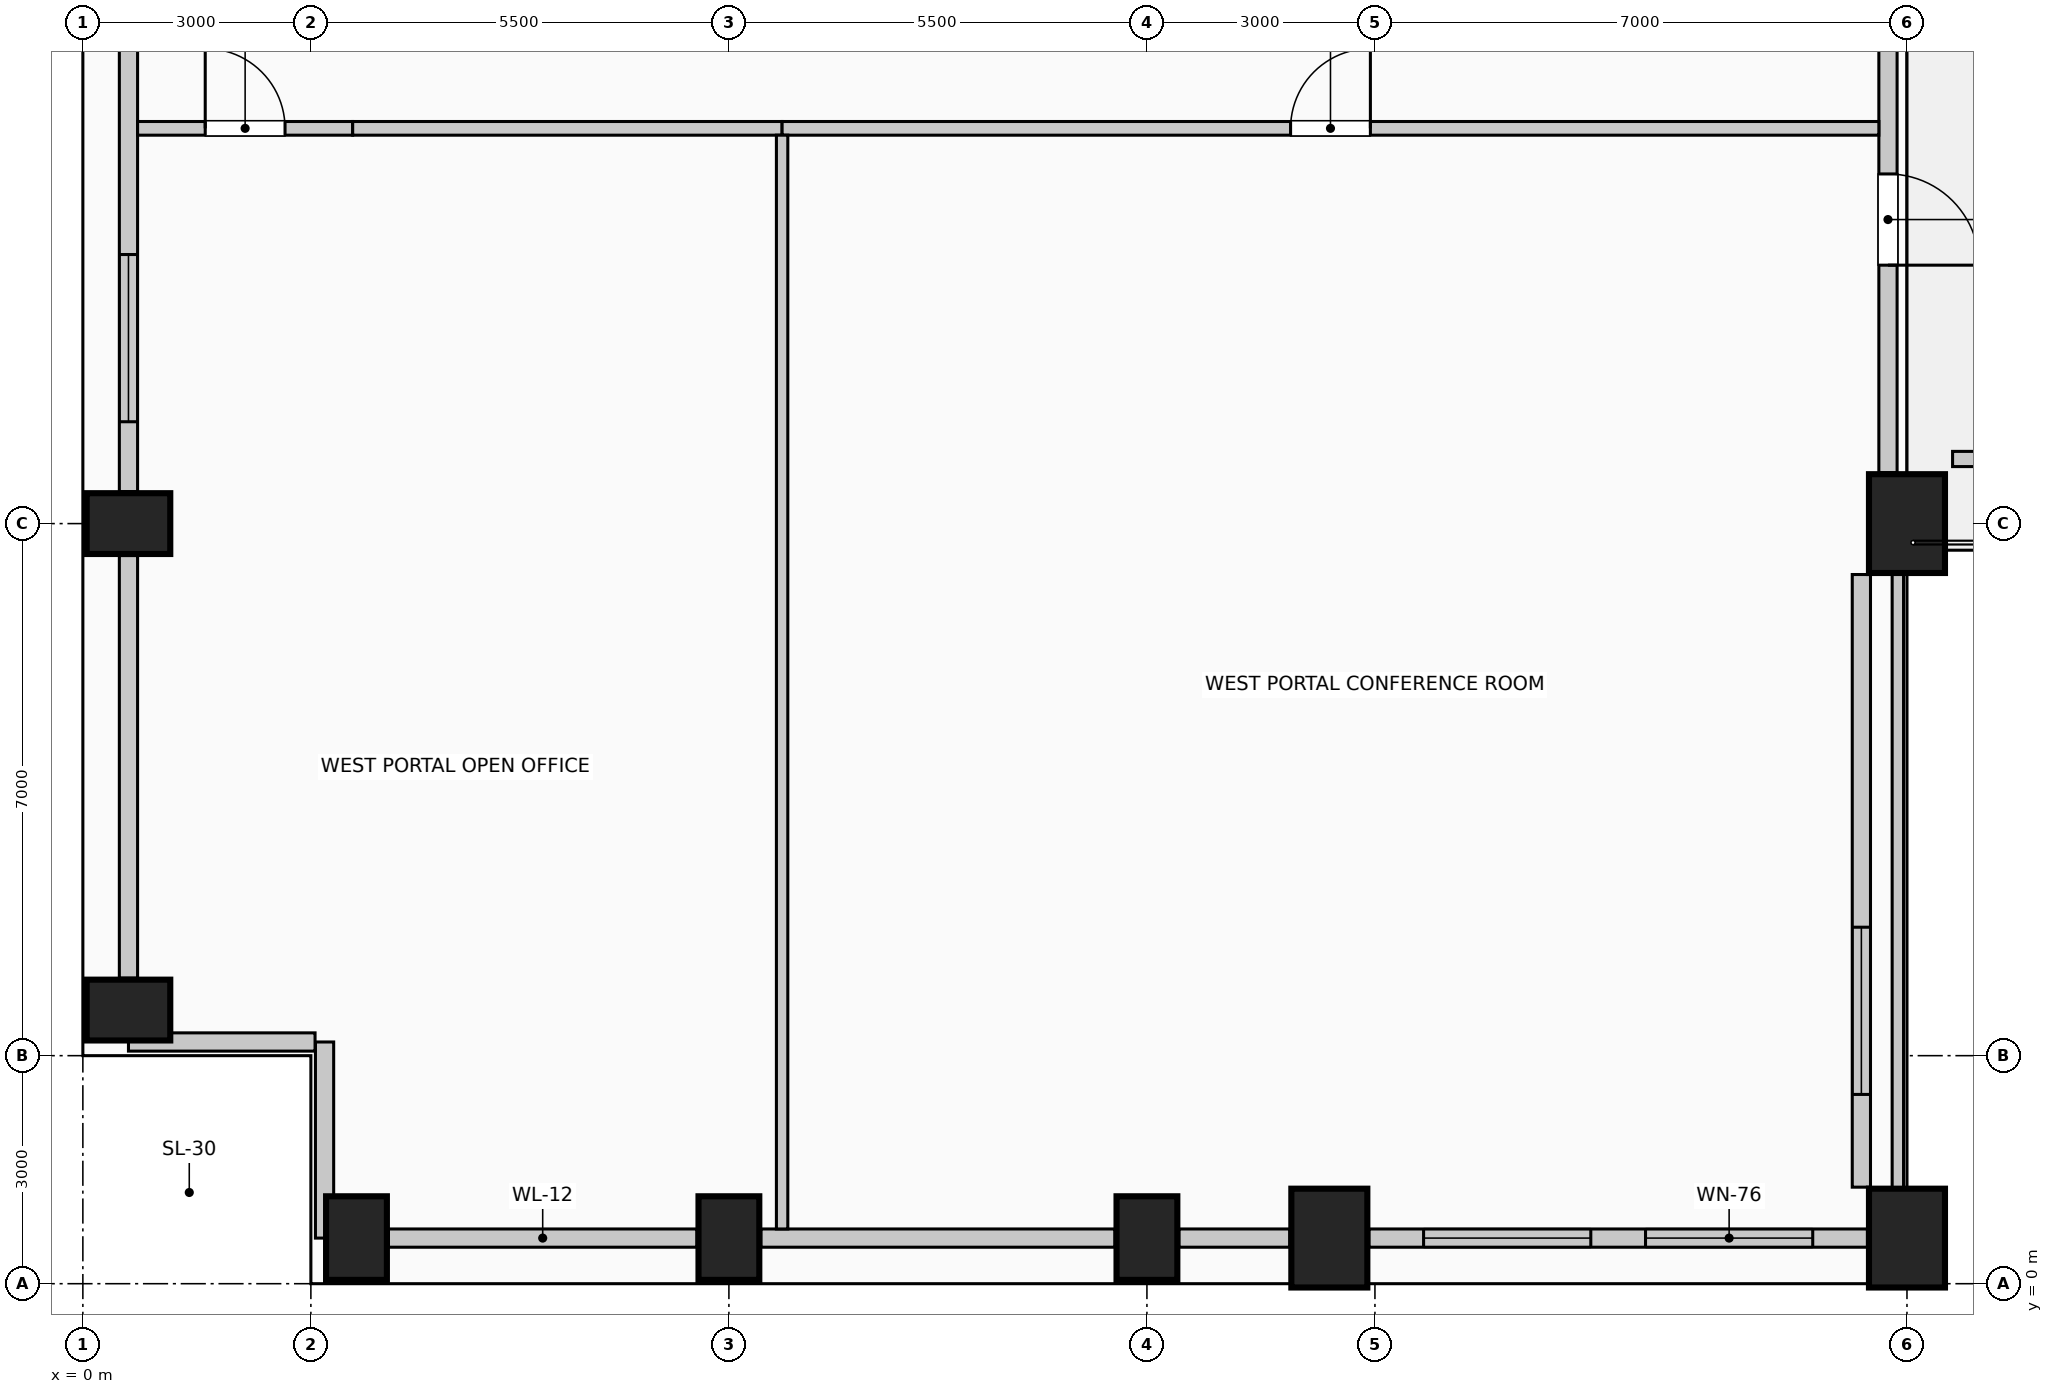
"""IFC4 building model, lengths in metres.
Left out: names, types, materials, properties, quantities, classifications, styles, units other than length and angle.
Written with IfcOpenShell. Run it as: python <this file> out.ifc"""

import sys

from ifc_helpers import new_model, si_unit, direction, frame, frame_2d, origin, origin_2d, place, context, subcontext, project, spatial, rectangle, extrude, element, fill, save


model = new_model("IFC4")
c1 = context("Model", 3, precision=1e-05, world=origin(), true_north=direction((0.0, 1.0)))
c2 = subcontext(c1, "Body", "Model", "MODEL_VIEW")
j1 = project(units=[si_unit("LENGTHUNIT", "METRE"), si_unit("PLANEANGLEUNIT", "RADIAN")], contexts=[c1])
p1 = place(None, origin())
s1 = spatial("IfcSite", under=j1, at=p1, CompositionType="ELEMENT")
p2 = place(p1, origin())
s2 = spatial("IfcBuilding", under=s1, at=p2, CompositionType="ELEMENT")
p3 = place(p2, frame((0.0, 0.0, 182.6)))
s3 = spatial("IfcBuildingStorey", under=s2, at=p3, CompositionType="ELEMENT", Elevation=182.6)
for number, where, z_axis, x_axis in (
    (1, (3.6, 0.6, 0.0), (0.0, 0.0, 1.0), (1.0, 0.0, 0.0)),
    (2, (8.5, 0.6, 0.0), (0.0, 0.0, 1.0), (1.0, 0.0, 0.0)),
    (3, (14.0, 0.6, 0.0), (0.0, 0.0, 1.0), (1.0, 0.0, 0.0)),
):
    element("IfcColumn", number, at=place(p3, frame(where, z_axis=z_axis, x_axis=x_axis)), inside=s3, PredefinedType="COLUMN", context=c2, shape_type="SweptSolid", body=[
        extrude(rectangle(XDim=0.8, YDim=1.1, at=origin_2d()), origin(), (0.0, 0.0, 1.0), 4.0),
    ])
for number, where, z_axis, x_axis in (
    (4, (16.4, 0.6, 0.0), (0.0, 0.0, 1.0), (1.0, 0.0, 0.0)),
    (5, (24.0, 0.6, 0.0), (0.0, 0.0, 1.0), (1.0, 0.0, 0.0)),
):
    element("IfcColumn", number, at=place(p3, frame(where, z_axis=z_axis, x_axis=x_axis)), inside=s3, PredefinedType="COLUMN", context=c2, shape_type="SweptSolid", body=[
        extrude(rectangle(XDim=1.0, YDim=1.3, at=origin_2d()), origin(), (0.0, 0.0, 1.0), 4.0),
    ])
for number, where, z_axis, x_axis in (
    (6, (0.6, 3.6, 0.0), (0.0, 0.0, 1.0), (0.0, 1.0, 0.0)),
    (7, (0.6, 10.0, 0.0), (0.0, 0.0, 1.0), (0.0, 1.0, 0.0)),
):
    element("IfcColumn", number, at=place(p3, frame(where, z_axis=z_axis, x_axis=x_axis)), inside=s3, PredefinedType="COLUMN", context=c2, shape_type="SweptSolid", body=[
        extrude(rectangle(XDim=0.8, YDim=1.1, at=origin_2d()), origin(), (0.0, 0.0, 1.0), 4.0),
    ])
p4 = place(p3, frame((24.0, 10.0, 0.0), z_axis=(0.0, 0.0, 1.0), x_axis=(1.0, 0.0, 0.0)))
e8 = element("IfcColumn", 8, at=p4, inside=s3, PredefinedType="COLUMN", context=c2, shape_type="SweptSolid", body=[
    extrude(rectangle(XDim=1.0, YDim=1.3, at=origin_2d()), origin(), (0.0, 0.0, 1.0), 4.0),
])
p5 = place(p3, frame((8.08, 0.6, 0.0), z_axis=(0.0, 0.0, 1.0), x_axis=(-1.0, 0.0, 0.0)))
e9 = element("IfcWall", 9, at=p5, inside=s3, PredefinedType="SOLIDWALL", context=c2, shape_type="SweptSolid", body=[
    extrude(rectangle(XDim=4.06, YDim=0.24, at=frame_2d((2.03, 0.0))), origin(), (0.0, 0.0, 1.0), 3.0),
])
p6 = place(p3, frame((13.58, 0.6, 0.0), z_axis=(0.0, 0.0, 1.0), x_axis=(-1.0, 0.0, 0.0)))
e10 = element("IfcWall", 10, at=p6, inside=s3, PredefinedType="SOLIDWALL", context=c2, shape_type="SweptSolid", body=[
    extrude(rectangle(XDim=4.66, YDim=0.24, at=frame_2d((2.33, 0.0))), origin(), (0.0, 0.0, 1.0), 3.0),
])
p7 = place(p3, frame((15.88, 0.6, 0.0), z_axis=(0.0, 0.0, 1.0), x_axis=(-1.0, 0.0, 0.0)))
e11 = element("IfcWall", 11, at=p7, inside=s3, PredefinedType="SOLIDWALL", context=c2, shape_type="SweptSolid", body=[
    extrude(rectangle(XDim=1.46, YDim=0.24, at=frame_2d((0.73, 0.0))), origin(), (0.0, 0.0, 1.0), 3.0),
])
p8 = place(p3, frame((23.48, 0.6, 0.0), z_axis=(0.0, 0.0, 1.0), x_axis=(-1.0, 0.0, 0.0)))
e12 = element("IfcWall", 12, at=p8, inside=s3, PredefinedType="SOLIDWALL", context=c2, shape_type="SweptSolid", body=[
    extrude(rectangle(XDim=6.56, YDim=0.24, at=frame_2d((3.28, 0.0))), origin(), (0.0, 0.0, 1.0), 3.0),
])
p9 = place(p8, frame((0.72, 0.0, 0.42)))
e13 = element("IfcOpeningElement", 13, at=p9, cuts=e12, PredefinedType="OPENING", context=c2, shape_type="SweptSolid", body=[
    extrude(rectangle(XDim=2.2, YDim=1.95, at=frame_2d((1.1, 0.975))), frame((0.0, 0.13, 0.0), z_axis=(0.0, -1.0, 0.0), x_axis=(1.0, 0.0, 0.0)), (0.0, 0.0, 1.0), 0.26),
])
p10 = place(p8, frame((3.64, 0.0, 0.42)))
e14 = element("IfcOpeningElement", 14, at=p10, cuts=e12, PredefinedType="OPENING", context=c2, shape_type="SweptSolid", body=[
    extrude(rectangle(XDim=2.2, YDim=1.95, at=frame_2d((1.1, 0.975))), frame((0.0, 0.13, 0.0), z_axis=(0.0, -1.0, 0.0), x_axis=(1.0, 0.0, 0.0)), (0.0, 0.0, 1.0), 0.26),
])
p11 = place(p3, frame((0.6, 4.02, 0.0), z_axis=(0.0, 0.0, 1.0), x_axis=(0.0, 1.0, 0.0)))
e15 = element("IfcWall", 15, at=p11, inside=s3, PredefinedType="SOLIDWALL", context=c2, shape_type="SweptSolid", body=[
    extrude(rectangle(XDim=5.56, YDim=0.24, at=frame_2d((2.78, 0.0))), origin(), (0.0, 0.0, 1.0), 3.0),
])
p12 = place(p3, frame((0.6, 10.42, 0.0), z_axis=(0.0, 0.0, 1.0), x_axis=(0.0, 1.0, 0.0)))
e16 = element("IfcWall", 16, at=p12, inside=s3, PredefinedType="SOLIDWALL", context=c2, shape_type="SweptSolid", body=[
    extrude(rectangle(XDim=7.16, YDim=0.24, at=frame_2d((3.58, 0.0))), origin(), (0.0, 0.0, 1.0), 3.0),
])
p13 = place(p12, frame((0.92, 0.0, 0.42)))
e17 = element("IfcOpeningElement", 17, at=p13, cuts=e16, PredefinedType="OPENING", context=c2, shape_type="SweptSolid", body=[
    extrude(rectangle(XDim=2.2, YDim=1.95, at=frame_2d((1.1, 0.975))), frame((0.0, 0.13, 0.0), z_axis=(0.0, -1.0, 0.0), x_axis=(1.0, 0.0, 0.0)), (0.0, 0.0, 1.0), 0.26),
])
p14 = place(p3, frame((3.18, 0.6, 0.0), z_axis=(0.0, 0.0, 1.0), x_axis=(0.0, 1.0, 0.0)))
e18 = element("IfcWall", 18, at=p14, inside=s3, PredefinedType="SOLIDWALL", context=c2, shape_type="SweptSolid", body=[
    extrude(rectangle(XDim=2.58, YDim=0.24, at=frame_2d((1.29, 0.0))), origin(), (0.0, 0.0, 1.0), 3.75),
])
p15 = place(p3, frame((3.055, 3.18, 0.0), z_axis=(0.0, 0.0, 1.0), x_axis=(-1.0, 0.0, 0.0)))
e19 = element("IfcWall", 19, at=p15, inside=s3, PredefinedType="SOLIDWALL", context=c2, shape_type="SweptSolid", body=[
    extrude(rectangle(XDim=2.455, YDim=0.24, at=frame_2d((1.228, 0.0))), origin(), (0.0, 0.0, 1.0), 3.75),
])
p16 = place(p3, frame((23.4, 9.33, 0.0), z_axis=(0.0, 0.0, 1.0), x_axis=(0.0, -1.0, 0.0)))
e20 = element("IfcWall", 20, at=p16, inside=s3, PredefinedType="SOLIDWALL", context=c2, shape_type="SweptSolid", body=[
    extrude(rectangle(XDim=8.06, YDim=0.24, at=frame_2d((4.03, 0.0))), origin(), (0.0, 0.0, 1.0), 3.75),
])
p17 = place(p16, frame((4.64, 0.0, 0.42)))
e21 = element("IfcOpeningElement", 21, at=p17, cuts=e20, PredefinedType="OPENING", context=c2, shape_type="SweptSolid", body=[
    extrude(rectangle(XDim=2.2, YDim=1.95, at=frame_2d((1.1, 0.975))), frame((0.0, 0.13, 0.0), z_axis=(0.0, -1.0, 0.0), x_axis=(1.0, 0.0, 0.0)), (0.0, 0.0, 1.0), 0.26),
])
p18 = place(p3, frame((23.75, 17.33, 0.0), z_axis=(0.0, 0.0, 1.0), x_axis=(0.0, -1.0, 0.0)))
e22 = element("IfcWall", 22, at=p18, inside=s3, PredefinedType="SOLIDWALL", context=c2, shape_type="SweptSolid", body=[
    extrude(rectangle(XDim=6.66, YDim=0.24, at=frame_2d((3.33, 0.0))), origin(), (0.0, 0.0, 1.0), 3.15),
])
p19 = place(p18, frame((2.73, 0.0, 0.0)))
e23 = element("IfcOpeningElement", 23, at=p19, cuts=e22, PredefinedType="OPENING", context=c2, shape_type="SweptSolid", body=[
    extrude(rectangle(XDim=1.2, YDim=2.25, at=frame_2d((0.6, 1.125))), frame((0.0, 0.13, 0.0), z_axis=(0.0, -1.0, 0.0), x_axis=(1.0, 0.0, 0.0)), (0.0, 0.0, 1.0), 0.26),
])
p20 = place(p3, frame((24.6, 10.85, 0.0), z_axis=(0.0, 0.0, 1.0), x_axis=(1.0, 0.0, 0.0)))
e24 = element("IfcWall", 24, at=p20, inside=s3, PredefinedType="USERDEFINED", context=c2, shape_type="SweptSolid", body=[
    extrude(rectangle(XDim=8.8, YDim=0.2, at=frame_2d((4.4, 0.0))), origin(), (0.0, 0.0, 1.0), 0.55),
])
p21 = place(p3, frame((0.72, 15.2, 0.0), z_axis=(0.0, 0.0, 1.0), x_axis=(1.0, 0.0, 0.0)))
e25 = element("IfcWall", 25, at=p21, inside=s3, PredefinedType="PARTITIONING", context=c2, shape_type="SweptSolid", body=[
    extrude(rectangle(XDim=2.83, YDim=0.18, at=frame_2d((1.415, 0.0))), origin(), (0.0, 0.0, 1.0), 3.75),
])
p22 = place(p21, frame((0.89, 0.0, 0.0)))
e26 = element("IfcOpeningElement", 26, at=p22, cuts=e25, PredefinedType="OPENING", context=c2, shape_type="SweptSolid", body=[
    extrude(rectangle(XDim=1.05, YDim=2.15, at=frame_2d((0.525, 1.075))), frame((0.0, 0.1, 0.0), z_axis=(0.0, -1.0, 0.0), x_axis=(1.0, 0.0, 0.0)), (0.0, 0.0, 1.0), 0.2),
])
p23 = place(p3, frame((3.55, 15.2, 0.0), z_axis=(0.0, 0.0, 1.0), x_axis=(1.0, 0.0, 0.0)))
e27 = element("IfcWall", 27, at=p23, inside=s3, PredefinedType="PARTITIONING", context=c2, shape_type="SweptSolid", body=[
    extrude(rectangle(XDim=5.65, YDim=0.18, at=frame_2d((2.825, 0.0))), origin(), (0.0, 0.0, 1.0), 3.75),
])
p24 = place(p3, frame((9.2, 15.2, 0.0), z_axis=(0.0, 0.0, 1.0), x_axis=(1.0, 0.0, 0.0)))
e28 = element("IfcWall", 28, at=p24, inside=s3, PredefinedType="PARTITIONING", context=c2, shape_type="SweptSolid", body=[
    extrude(rectangle(XDim=14.43, YDim=0.18, at=frame_2d((7.215, 0.0))), origin(), (0.0, 0.0, 1.0), 3.75),
])
p25 = place(p24, frame((6.69, 0.0, 0.0)))
e29 = element("IfcOpeningElement", 29, at=p25, cuts=e28, PredefinedType="OPENING", context=c2, shape_type="SweptSolid", body=[
    extrude(rectangle(XDim=1.05, YDim=2.15, at=frame_2d((0.525, 1.075))), frame((0.0, 0.1, 0.0), z_axis=(0.0, -1.0, 0.0), x_axis=(1.0, 0.0, 0.0)), (0.0, 0.0, 1.0), 0.2),
])
p26 = place(p3, frame((9.2, 0.72, 0.0), z_axis=(0.0, 0.0, 1.0), x_axis=(0.0, 1.0, 0.0)))
e30 = element("IfcWall", 30, at=p26, inside=s3, PredefinedType="PARTITIONING", context=c2, shape_type="SweptSolid", body=[
    extrude(rectangle(XDim=14.39, YDim=0.15, at=frame_2d((7.195, 0.0))), origin(), (0.0, 0.0, 1.0), 3.75),
])
p27 = place(p3, frame((23.88, 1.25, 0.0), z_axis=(0.0, 0.0, 1.0), x_axis=(0.0, 1.0, 0.0)))
e31 = element("IfcWall", 31, at=p27, inside=s3, PredefinedType="PARTITIONING", context=c2, shape_type="SweptSolid", body=[
    extrude(rectangle(XDim=8.1, YDim=0.15, at=frame_2d((4.05, 0.0))), origin(), (0.0, 0.0, 1.0), 3.145),
])
p28 = place(p9, origin())
e32 = element("IfcWindow", 32, at=p28, inside=s3, PartitioningType="SINGLE_PANEL", PredefinedType="WINDOW", context=c2, shape_type="SweptSolid", body=[
    extrude(rectangle(XDim=2.2, YDim=1.95, at=frame_2d((1.1, 0.975))), frame((0.0, 0.03, 0.0), z_axis=(0.0, -1.0, 0.0), x_axis=(1.0, 0.0, 0.0)), (0.0, 0.0, 1.0), 0.06),
])
fill(e13, e32)
p29 = place(p10, origin())
e33 = element("IfcWindow", 33, at=p29, inside=s3, PartitioningType="SINGLE_PANEL", PredefinedType="WINDOW", context=c2, shape_type="SweptSolid", body=[
    extrude(rectangle(XDim=2.2, YDim=1.95, at=frame_2d((1.1, 0.975))), frame((0.0, 0.03, 0.0), z_axis=(0.0, -1.0, 0.0), x_axis=(1.0, 0.0, 0.0)), (0.0, 0.0, 1.0), 0.06),
])
fill(e14, e33)
p30 = place(p13, origin())
e34 = element("IfcWindow", 34, at=p30, inside=s3, PartitioningType="SINGLE_PANEL", PredefinedType="WINDOW", context=c2, shape_type="SweptSolid", body=[
    extrude(rectangle(XDim=2.2, YDim=1.95, at=frame_2d((1.1, 0.975))), frame((0.0, 0.03, 0.0), z_axis=(0.0, -1.0, 0.0), x_axis=(1.0, 0.0, 0.0)), (0.0, 0.0, 1.0), 0.06),
])
fill(e17, e34)
p31 = place(p17, origin())
e35 = element("IfcWindow", 35, at=p31, inside=s3, PartitioningType="SINGLE_PANEL", PredefinedType="WINDOW", context=c2, shape_type="SweptSolid", body=[
    extrude(rectangle(XDim=2.2, YDim=1.95, at=frame_2d((1.1, 0.975))), frame((0.0, 0.03, 0.0), z_axis=(0.0, -1.0, 0.0), x_axis=(1.0, 0.0, 0.0)), (0.0, 0.0, 1.0), 0.06),
])
fill(e21, e35)
p32 = place(p19, origin())
e36 = element("IfcDoor", 36, at=p32, inside=s3, OperationType="SINGLE_SWING_RIGHT", PredefinedType="DOOR", context=c2, shape_type="SweptSolid", body=[
    extrude(rectangle(XDim=1.2, YDim=2.25, at=frame_2d((0.6, 1.125))), frame((0.0, 0.025, 0.0), z_axis=(0.0, -1.0, 0.0), x_axis=(1.0, 0.0, 0.0)), (0.0, 0.0, 1.0), 0.05),
])
fill(e23, e36)
p33 = place(p22, origin())
e37 = element("IfcDoor", 37, at=p33, inside=s3, OperationType="SINGLE_SWING_LEFT", PredefinedType="DOOR", context=c2, shape_type="SweptSolid", body=[
    extrude(rectangle(XDim=1.05, YDim=2.15, at=frame_2d((0.525, 1.075))), frame((0.0, 0.025, 0.0), z_axis=(0.0, -1.0, 0.0), x_axis=(1.0, 0.0, 0.0)), (0.0, 0.0, 1.0), 0.05),
])
fill(e26, e37)
p34 = place(p25, origin())
e38 = element("IfcDoor", 38, at=p34, inside=s3, OperationType="SINGLE_SWING_RIGHT", PredefinedType="DOOR", context=c2, shape_type="SweptSolid", body=[
    extrude(rectangle(XDim=1.05, YDim=2.15, at=frame_2d((0.525, 1.075))), frame((0.0, 0.025, 0.0), z_axis=(0.0, -1.0, 0.0), x_axis=(1.0, 0.0, 0.0)), (0.0, 0.0, 1.0), 0.05),
])
fill(e29, e38)
save(model, sys.argv[1])
